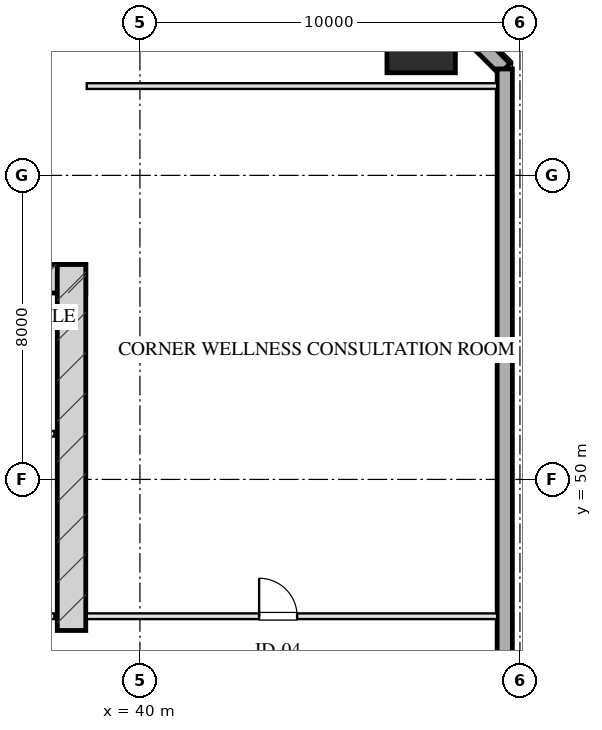
"""IFC4 building model, lengths in metres.
Left out: names, types, materials, properties, quantities, classifications, styles, units other than length and angle.
Written with IfcOpenShell. Run it as: python <this file> out.ifc"""

import sys

from ifc_helpers import new_model, si_unit, direction, frame, frame_2d, origin, origin_2d, place, context, subcontext, project, spatial, rectangle, hollow_rectangle, extrude, element, fill, save


model = new_model("IFC4")
c1 = context("Model", 3, precision=1e-05, world=origin(), true_north=direction((0.0, 1.0)))
c2 = subcontext(c1, "Body", "Model", "MODEL_VIEW")
j1 = project(units=[si_unit("LENGTHUNIT", "METRE"), si_unit("PLANEANGLEUNIT", "RADIAN")], contexts=[c1])
p1 = place(None, origin())
s1 = spatial("IfcSite", under=j1, at=p1, CompositionType="ELEMENT")
p2 = place(p1, origin())
s2 = spatial("IfcBuilding", under=s1, at=p2, CompositionType="ELEMENT")
p3 = place(p2, frame((0.0, 0.0, 42.0)))
s3 = spatial("IfcBuildingStorey", under=s2, at=p3, CompositionType="ELEMENT", Elevation=42.0)
p4 = place(p3, frame((21.425, 55.28, 0.0), z_axis=(0.0, 0.0, 1.0), x_axis=(1.0, 0.0, 0.0)))
e1 = element("IfcWall", 1, at=p4, inside=s3, PredefinedType="SHEAR", context=c2, shape_type="SweptSolid", body=[
    extrude(rectangle(XDim=17.15, YDim=0.75, at=frame_2d((8.575, 0.0))), origin(), (0.0, 0.0, 1.0), 4.0),
])
p5 = place(p3, frame((38.2, 46.025, 0.0), z_axis=(0.0, 0.0, 1.0), x_axis=(0.0, 1.0, 0.0)))
e2 = element("IfcWall", 2, at=p5, inside=s3, PredefinedType="SHEAR", context=c2, shape_type="SweptSolid", body=[
    extrude(rectangle(XDim=9.63, YDim=0.75, at=frame_2d((4.815, 0.0))), origin(), (0.0, 0.0, 1.0), 4.0),
])
p6 = place(p3, frame((47.4, 61.6, 0.0), z_axis=(0.0, 0.0, 1.0), x_axis=(1.0, 0.0, 0.0)))
e3 = element("IfcColumn", 3, at=p6, inside=s3, PredefinedType="COLUMN", context=c2, shape_type="SweptSolid", body=[
    extrude(hollow_rectangle(XDim=1.8, YDim=1.8, WallThickness=0.06, at=origin_2d()), origin(), (0.0, 0.0, 1.0), 4.001),
])
p7 = place(p3, frame((46.6, 63.8, 0.0), z_axis=(0.0, 0.0, 1.0), x_axis=(0.707106781187, -0.707106781187, 0.0)))
e4 = element("IfcWall", 4, at=p7, inside=s3, PredefinedType="SOLIDWALL", context=c2, shape_type="SweptSolid", body=[
    extrude(rectangle(XDim=4.243, YDim=0.4, at=frame_2d((2.121, 0.0))), origin(), (0.0, 0.0, 1.0), 3.1),
])
p8 = place(p3, frame((49.6, 60.8, 0.0), z_axis=(0.0, 0.0, 1.0), x_axis=(0.0, -1.0, 0.0)))
e5 = element("IfcWall", 5, at=p8, inside=s3, PredefinedType="SOLIDWALL", context=c2, shape_type="SweptSolid", body=[
    extrude(rectangle(XDim=53.6, YDim=0.4, at=frame_2d((26.8, 0.0))), origin(), (0.0, 0.0, 1.0), 3.1),
])
p9 = place(p8, frame((31.95, 0.0, 0.75)))
e6 = element("IfcOpeningElement", 6, at=p9, cuts=e5, PredefinedType="OPENING", context=c2, shape_type="SweptSolid", body=[
    extrude(rectangle(XDim=2.5, YDim=1.75, at=frame_2d((1.25, 0.875))), frame((0.0, 0.21, 0.0), z_axis=(0.0, -1.0, 0.0), x_axis=(1.0, 0.0, 0.0)), (0.0, 0.0, 1.0), 0.42),
])
p10 = place(p8, frame((19.15, 0.0, 0.75)))
e7 = element("IfcOpeningElement", 7, at=p10, cuts=e5, PredefinedType="OPENING", context=c2, shape_type="SweptSolid", body=[
    extrude(rectangle(XDim=2.5, YDim=1.75, at=frame_2d((1.25, 0.875))), frame((0.0, 0.21, 0.0), z_axis=(0.0, -1.0, 0.0), x_axis=(1.0, 0.0, 0.0)), (0.0, 0.0, 1.0), 0.42),
])
p11 = place(p3, frame((33.95, 46.4, 0.0), z_axis=(0.0, 0.0, 1.0), x_axis=(1.0, 0.0, 0.0)))
e8 = element("IfcWall", 8, at=p11, inside=s3, PredefinedType="PARTITIONING", context=c2, shape_type="SweptSolid", body=[
    extrude(rectangle(XDim=3.8, YDim=0.15, at=frame_2d((1.9, 0.0))), origin(), (0.0, 0.0, 1.0), 3.705),
])
p12 = place(p11, frame((0.22, 0.0, 0.0)))
e9 = element("IfcOpeningElement", 9, at=p12, cuts=e8, PredefinedType="OPENING", context=c2, shape_type="SweptSolid", body=[
    extrude(rectangle(XDim=0.95, YDim=2.05, at=frame_2d((0.475, 1.025))), frame((0.0, 0.085, 0.0), z_axis=(0.0, -1.0, 0.0), x_axis=(1.0, 0.0, 0.0)), (0.0, 0.0, 1.0), 0.17),
])
p13 = place(p3, frame((35.45, 51.2, 0.0), z_axis=(0.0, 0.0, 1.0), x_axis=(1.0, 0.0, 0.0)))
e10 = element("IfcWall", 10, at=p13, inside=s3, PredefinedType="PARTITIONING", context=c2, shape_type="SweptSolid", body=[
    extrude(rectangle(XDim=2.3, YDim=0.15, at=frame_2d((1.15, 0.0))), origin(), (0.0, 0.0, 1.0), 3.705),
])
p14 = place(p3, frame((38.6, 60.35, 0.0), z_axis=(0.0, 0.0, 1.0), x_axis=(1.0, 0.0, 0.0)))
e11 = element("IfcWall", 11, at=p14, inside=s3, PredefinedType="PARTITIONING", context=c2, shape_type="SweptSolid", body=[
    extrude(rectangle(XDim=10.8, YDim=0.15, at=frame_2d((5.4, 0.0))), origin(), (0.0, 0.0, 1.0), 3.705),
])
p15 = place(p3, frame((38.6, 46.4, 0.0), z_axis=(0.0, 0.0, 1.0), x_axis=(1.0, 0.0, 0.0)))
e12 = element("IfcWall", 12, at=p15, inside=s3, PredefinedType="PARTITIONING", context=c2, shape_type="SweptSolid", body=[
    extrude(rectangle(XDim=10.8, YDim=0.15, at=frame_2d((5.4, 0.0))), origin(), (0.0, 0.0, 1.0), 3.705),
])
p16 = place(p15, frame((4.536, 0.0, 0.0)))
e13 = element("IfcOpeningElement", 13, at=p16, cuts=e12, PredefinedType="OPENING", context=c2, shape_type="SweptSolid", body=[
    extrude(rectangle(XDim=1.0, YDim=2.05, at=frame_2d((0.5, 1.025))), frame((0.0, 0.085, 0.0), z_axis=(0.0, -1.0, 0.0), x_axis=(1.0, 0.0, 0.0)), (0.0, 0.0, 1.0), 0.17),
])
p17 = place(p16, origin())
e14 = element("IfcDoor", 14, at=p17, inside=s3, OperationType="SINGLE_SWING_LEFT", PredefinedType="DOOR", context=c2, shape_type="SweptSolid", body=[
    extrude(rectangle(XDim=1.0, YDim=2.05, at=frame_2d((0.5, 1.025))), frame((0.0, 0.025, 0.0), z_axis=(0.0, -1.0, 0.0), x_axis=(1.0, 0.0, 0.0)), (0.0, 0.0, 1.0), 0.05),
])
fill(e13, e14)
save(model, sys.argv[1])
